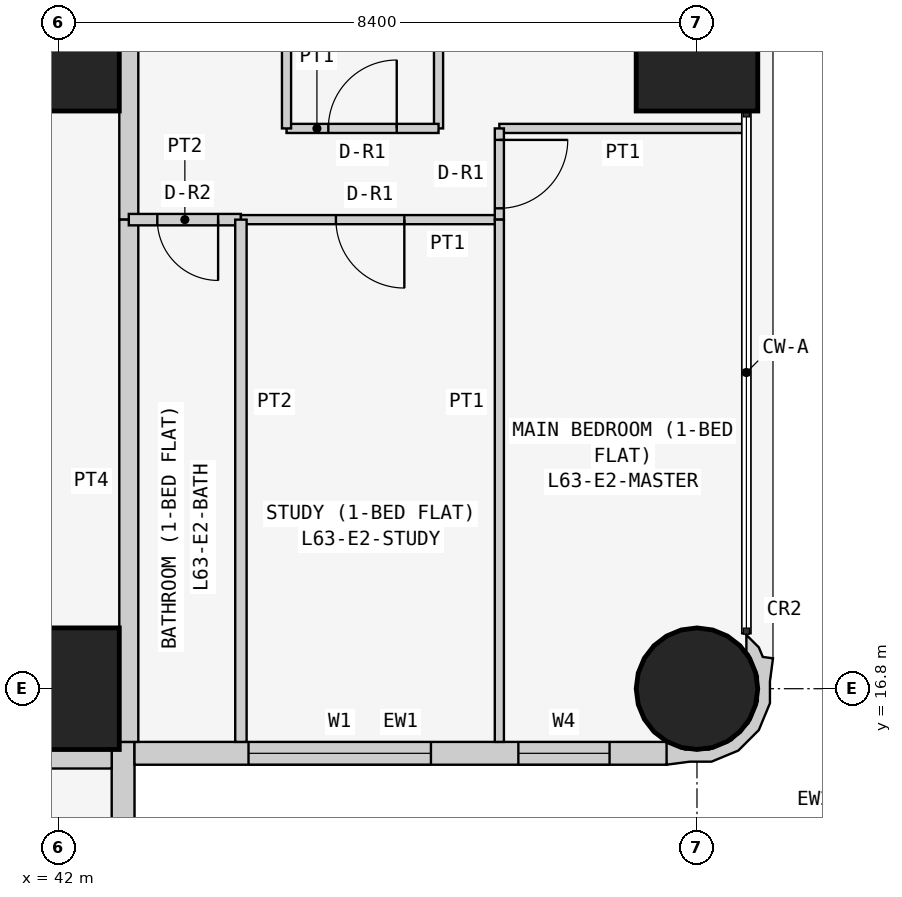
"""IFC4 building model, lengths in metres.
Left out: names, types, materials, properties, quantities, classifications, styles, units other than length and angle.
Written with IfcOpenShell. Run it as: python <this file> out.ifc"""

import sys

from ifc_helpers import new_model, si_unit, direction, frame, frame_2d, origin, origin_2d, place, context, subcontext, project, spatial, polyline, rectangle, circle, outline, extrude, element, fill, save


model = new_model("IFC4")
c1 = context("Model", 3, precision=1e-05, world=origin(), true_north=direction((0.0, 1.0)))
c2 = subcontext(c1, "Body", "Model", "MODEL_VIEW")
j1 = project(units=[si_unit("LENGTHUNIT", "METRE"), si_unit("PLANEANGLEUNIT", "RADIAN")], contexts=[c1])
p1 = place(None, origin())
s1 = spatial("IfcSite", under=j1, at=p1, CompositionType="ELEMENT")
p2 = place(p1, origin())
s2 = spatial("IfcBuilding", under=s1, at=p2, CompositionType="ELEMENT")
p3 = place(p2, frame((0.0, 0.0, 240.9)))
s3 = spatial("IfcBuildingStorey", under=s2, at=p3, CompositionType="ELEMENT", Elevation=240.9)
for number, where, z_axis, x_axis in (
    (1, (42.0, 16.8, 0.0), (0.0, 0.0, 1.0), (1.0, 0.0, 0.0)),
    (2, (42.0, 25.2, 0.0), (0.0, 0.0, 1.0), (1.0, 0.0, 0.0)),
):
    element("IfcColumn", number, at=place(p3, frame(where, z_axis=z_axis, x_axis=x_axis)), inside=s3, PredefinedType="COLUMN", context=c2, shape_type="SweptSolid", body=[
        extrude(rectangle(XDim=1.6, YDim=1.6, at=origin_2d()), origin(), (0.0, 0.0, 1.0), 3.6),
    ])
p4 = place(p3, frame((50.4, 16.8, 0.0), z_axis=(0.0, 0.0, 1.0), x_axis=(1.0, 0.0, 0.0)))
e3 = element("IfcColumn", 3, at=p4, inside=s3, PredefinedType="COLUMN", context=c2, shape_type="SweptSolid", body=[
    extrude(circle(Radius=0.8, at=origin_2d()), origin(), (0.0, 0.0, 1.0), 3.6),
])
p5 = place(p3, frame((50.4, 25.2, 0.0), z_axis=(0.0, 0.0, 1.0), x_axis=(1.0, 0.0, 0.0)))
e4 = element("IfcColumn", 4, at=p5, inside=s3, PredefinedType="COLUMN", context=c2, shape_type="SweptSolid", body=[
    extrude(rectangle(XDim=1.6, YDim=1.6, at=origin_2d()), origin(), (0.0, 0.0, 1.0), 3.6),
])
p6 = place(p3, frame((42.85, 8.8, 0.0), z_axis=(0.0, 0.0, 1.0), x_axis=(0.0, 1.0, 0.0)))
e5 = element("IfcWall", 5, at=p6, inside=s3, PredefinedType="SOLIDWALL", context=c2, shape_type="SweptSolid", body=[
    extrude(rectangle(XDim=7.3, YDim=0.3, at=frame_2d((3.65, 0.0))), origin(), (0.0, 0.0, 1.0), 3.45),
])
p7 = place(p6, frame((3.1, 0.0, 0.9)))
e6 = element("IfcOpeningElement", 6, at=p7, cuts=e5, PredefinedType="OPENING", context=c2, shape_type="SweptSolid", body=[
    extrude(rectangle(XDim=2.4, YDim=1.5, at=frame_2d((1.2, 0.75))), frame((0.0, 0.16, 0.0), z_axis=(0.0, -1.0, 0.0), x_axis=(1.0, 0.0, 0.0)), (0.0, 0.0, 1.0), 0.32),
])
p8 = place(p6, frame((0.75, 0.0, 0.9)))
e7 = element("IfcOpeningElement", 7, at=p8, cuts=e5, PredefinedType="OPENING", context=c2, shape_type="SweptSolid", body=[
    extrude(rectangle(XDim=1.2, YDim=1.5, at=frame_2d((0.6, 0.75))), frame((0.0, 0.16, 0.0), z_axis=(0.0, -1.0, 0.0), x_axis=(1.0, 0.0, 0.0)), (0.0, 0.0, 1.0), 0.32),
])
p9 = place(p3, frame((43.0, 15.95, 0.0), z_axis=(0.0, 0.0, 1.0), x_axis=(1.0, 0.0, 0.0)))
e8 = element("IfcWall", 8, at=p9, inside=s3, PredefinedType="SOLIDWALL", context=c2, shape_type="SweptSolid", body=[
    extrude(rectangle(XDim=7.0, YDim=0.3, at=frame_2d((3.5, 0.0))), origin(), (0.0, 0.0, 1.0), 3.45),
])
p10 = place(p9, frame((1.5, 0.0, 0.9)))
e9 = element("IfcOpeningElement", 9, at=p10, cuts=e8, PredefinedType="OPENING", context=c2, shape_type="SweptSolid", body=[
    extrude(rectangle(XDim=2.4, YDim=1.5, at=frame_2d((1.2, 0.75))), frame((0.0, 0.16, 0.0), z_axis=(0.0, -1.0, 0.0), x_axis=(1.0, 0.0, 0.0)), (0.0, 0.0, 1.0), 0.32),
])
p11 = place(p9, frame((5.05, 0.0, 0.9)))
e10 = element("IfcOpeningElement", 10, at=p11, cuts=e8, PredefinedType="OPENING", context=c2, shape_type="SweptSolid", body=[
    extrude(rectangle(XDim=1.2, YDim=1.5, at=frame_2d((0.6, 0.75))), frame((0.0, 0.16, 0.0), z_axis=(0.0, -1.0, 0.0), x_axis=(1.0, 0.0, 0.0)), (0.0, 0.0, 1.0), 0.32),
])
p12 = place(p3, frame((50.073, 15.983, 0.0), z_axis=(0.0, 0.0, 1.0), x_axis=(0.93923434088, -0.343276641956, 0.0)))
e11 = element("IfcWall", 11, at=p12, inside=s3, PredefinedType="SOLIDWALL", context=c2, shape_type="SweptSolid", body=[
    extrude(outline(polyline([(0.828, 1.598), (0.697, 1.569), (0.604, 1.67), (0.394, 1.767), (0.471, 1.556), (0.509, 1.539), (0.724, 1.304), (0.833, 1.005), (0.82, 0.686), (0.686, 0.397), (0.451, 0.182), (0.152, 0.073), (-0.116, 0.084), (-0.128, 0.078), (-0.146, 0.071), (-0.006, -0.197), (0.266, -0.055), (0.535, 0.044), (0.817, 0.302), (0.978, 0.648), (0.994, 1.03), (0.895, 1.3), (0.828, 1.598)])), origin(), (0.0, 0.0, 1.0), 3.45),
])
p13 = place(p3, frame((42.925, 29.4, 0.0), z_axis=(0.0, 0.0, 1.0), x_axis=(0.0, -1.0, 0.0)))
e12 = element("IfcWall", 12, at=p13, inside=s3, PredefinedType="PARTITIONING", context=c2, shape_type="SweptSolid", body=[
    extrude(rectangle(XDim=6.429, YDim=0.25, at=frame_2d((3.214, 0.0))), origin(), (0.0, 0.0, 1.0), 3.45),
])
p14 = place(p13, frame((0.5, 0.0, 0.0)))
e13 = element("IfcOpeningElement", 13, at=p14, cuts=e12, PredefinedType="OPENING", context=c2, shape_type="SweptSolid", body=[
    extrude(rectangle(XDim=1.0, YDim=2.1, at=frame_2d((0.5, 1.05))), frame((0.0, 0.135, 0.0), z_axis=(0.0, -1.0, 0.0), x_axis=(1.0, 0.0, 0.0)), (0.0, 0.0, 1.0), 0.27),
])
for number, where, z_axis, x_axis in (
    (14, (42.925, 22.971, 0.0), (0.0, 0.0, 1.0), (0.0, -1.0, 0.0)),
    (15, (42.7, 15.875, 0.0), (0.0, 0.0, 1.0), (-1.0, 0.0, 0.0)),
):
    element("IfcWall", number, at=place(p3, frame(where, z_axis=z_axis, x_axis=x_axis)), inside=s3, PredefinedType="PARTITIONING", context=c2, shape_type="SweptSolid", body=[
        extrude(rectangle(XDim=6.871, YDim=0.25, at=frame_2d((3.436, 0.0))), origin(), (0.0, 0.0, 1.0), 3.45),
    ])
p15 = place(p3, frame((47.0, 29.4, 0.0), z_axis=(0.0, 0.0, 1.0), x_axis=(0.0, -1.0, 0.0)))
e16 = element("IfcWall", 16, at=p15, inside=s3, PredefinedType="PARTITIONING", context=c2, shape_type="SweptSolid", body=[
    extrude(rectangle(XDim=5.229, YDim=0.12, at=frame_2d((2.615, 0.0))), origin(), (0.0, 0.0, 1.0), 3.45),
])
p16 = place(p3, frame((47.0, 24.171, 0.0), z_axis=(0.0, 0.0, 1.0), x_axis=(-1.0, 0.0, 0.0)))
e17 = element("IfcWall", 17, at=p16, inside=s3, PredefinedType="PARTITIONING", context=c2, shape_type="SweptSolid", body=[
    extrude(rectangle(XDim=2.0, YDim=0.12, at=frame_2d((1.0, 0.0))), origin(), (0.0, 0.0, 1.0), 3.45),
])
p17 = place(p16, frame((0.55, 0.0, 0.0)))
e18 = element("IfcOpeningElement", 18, at=p17, cuts=e17, PredefinedType="OPENING", context=c2, shape_type="SweptSolid", body=[
    extrude(rectangle(XDim=0.9, YDim=2.1, at=frame_2d((0.45, 1.05))), frame((0.0, 0.07, 0.0), z_axis=(0.0, -1.0, 0.0), x_axis=(1.0, 0.0, 0.0)), (0.0, 0.0, 1.0), 0.14),
])
p18 = place(p3, frame((45.0, 24.171, 0.0), z_axis=(0.0, 0.0, 1.0), x_axis=(0.0, 1.0, 0.0)))
e19 = element("IfcWall", 19, at=p18, inside=s3, PredefinedType="PARTITIONING", context=c2, shape_type="SweptSolid", body=[
    extrude(rectangle(XDim=5.229, YDim=0.12, at=frame_2d((2.615, 0.0))), origin(), (0.0, 0.0, 1.0), 3.45),
])
p19 = place(p3, frame((44.4, 22.971, 0.0), z_axis=(0.0, 0.0, 1.0), x_axis=(-1.0, 0.0, 0.0)))
e20 = element("IfcWall", 20, at=p19, inside=s3, PredefinedType="PARTITIONING", context=c2, shape_type="SweptSolid", body=[
    extrude(rectangle(XDim=1.475, YDim=0.15, at=frame_2d((0.737, 0.0))), origin(), (0.0, 0.0, 1.0), 3.45),
])
p20 = place(p19, frame((0.3, 0.0, 0.0)))
e21 = element("IfcOpeningElement", 21, at=p20, cuts=e20, PredefinedType="OPENING", context=c2, shape_type="SweptSolid", body=[
    extrude(rectangle(XDim=0.8, YDim=2.1, at=frame_2d((0.4, 1.05))), frame((0.0, 0.085, 0.0), z_axis=(0.0, -1.0, 0.0), x_axis=(1.0, 0.0, 0.0)), (0.0, 0.0, 1.0), 0.17),
])
p21 = place(p3, frame((47.8, 22.971, 0.0), z_axis=(0.0, 0.0, 1.0), x_axis=(-1.0, 0.0, 0.0)))
e22 = element("IfcWall", 22, at=p21, inside=s3, PredefinedType="PARTITIONING", context=c2, shape_type="SweptSolid", body=[
    extrude(rectangle(XDim=3.4, YDim=0.12, at=frame_2d((1.7, 0.0))), origin(), (0.0, 0.0, 1.0), 3.45),
])
p22 = place(p21, frame((1.25, 0.0, 0.0)))
e23 = element("IfcOpeningElement", 23, at=p22, cuts=e22, PredefinedType="OPENING", context=c2, shape_type="SweptSolid", body=[
    extrude(rectangle(XDim=0.9, YDim=2.1, at=frame_2d((0.45, 1.05))), frame((0.0, 0.07, 0.0), z_axis=(0.0, -1.0, 0.0), x_axis=(1.0, 0.0, 0.0)), (0.0, 0.0, 1.0), 0.14),
])
p23 = place(p3, frame((51.05, 24.171, 0.0), z_axis=(0.0, 0.0, 1.0), x_axis=(-1.0, 0.0, 0.0)))
e24 = element("IfcWall", 24, at=p23, inside=s3, PredefinedType="PARTITIONING", context=c2, shape_type="SweptSolid", body=[
    extrude(rectangle(XDim=3.25, YDim=0.12, at=frame_2d((1.625, 0.0))), origin(), (0.0, 0.0, 1.0), 3.45),
])
p24 = place(p3, frame((47.8, 24.171, 0.0), z_axis=(0.0, 0.0, 1.0), x_axis=(0.0, -1.0, 0.0)))
e25 = element("IfcWall", 25, at=p24, inside=s3, PredefinedType="PARTITIONING", context=c2, shape_type="SweptSolid", body=[
    extrude(rectangle(XDim=1.2, YDim=0.12, at=frame_2d((0.6, 0.0))), origin(), (0.0, 0.0, 1.0), 3.45),
])
p25 = place(p24, frame((0.151, 0.0, 0.0)))
e26 = element("IfcOpeningElement", 26, at=p25, cuts=e25, PredefinedType="OPENING", context=c2, shape_type="SweptSolid", body=[
    extrude(rectangle(XDim=0.9, YDim=2.1, at=frame_2d((0.45, 1.05))), frame((0.0, 0.07, 0.0), z_axis=(0.0, -1.0, 0.0), x_axis=(1.0, 0.0, 0.0)), (0.0, 0.0, 1.0), 0.14),
])
p26 = place(p3, frame((44.4, 22.971, 0.0), z_axis=(0.0, 0.0, 1.0), x_axis=(0.0, -1.0, 0.0)))
e27 = element("IfcWall", 27, at=p26, inside=s3, PredefinedType="PARTITIONING", context=c2, shape_type="SweptSolid", body=[
    extrude(rectangle(XDim=6.871, YDim=0.15, at=frame_2d((3.436, 0.0))), origin(), (0.0, 0.0, 1.0), 3.45),
])
p27 = place(p3, frame((47.8, 22.971, 0.0), z_axis=(0.0, 0.0, 1.0), x_axis=(0.0, -1.0, 0.0)))
e28 = element("IfcWall", 28, at=p27, inside=s3, PredefinedType="PARTITIONING", context=c2, shape_type="SweptSolid", body=[
    extrude(rectangle(XDim=6.871, YDim=0.12, at=frame_2d((3.436, 0.0))), origin(), (0.0, 0.0, 1.0), 3.45),
])
p28 = place(p10, origin())
e29 = element("IfcWindow", 29, at=p28, inside=s3, PartitioningType="SINGLE_PANEL", PredefinedType="WINDOW", context=c2, shape_type="SweptSolid", body=[
    extrude(rectangle(XDim=2.4, YDim=1.5, at=frame_2d((1.2, 0.75))), frame((0.0, 0.03, 0.0), z_axis=(0.0, -1.0, 0.0), x_axis=(1.0, 0.0, 0.0)), (0.0, 0.0, 1.0), 0.06),
])
fill(e9, e29)
p29 = place(p11, origin())
e30 = element("IfcWindow", 30, at=p29, inside=s3, PartitioningType="SINGLE_PANEL", PredefinedType="WINDOW", context=c2, shape_type="SweptSolid", body=[
    extrude(rectangle(XDim=1.2, YDim=1.5, at=frame_2d((0.6, 0.75))), frame((0.0, 0.03, 0.0), z_axis=(0.0, -1.0, 0.0), x_axis=(1.0, 0.0, 0.0)), (0.0, 0.0, 1.0), 0.06),
])
fill(e10, e30)
p30 = place(p17, frame((0.9, 0.0, 0.0), z_axis=(0.0, 0.0, 1.0), x_axis=(-1.0, 0.0, 0.0)))
e31 = element("IfcDoor", 31, at=p30, inside=s3, OperationType="SINGLE_SWING_RIGHT", PredefinedType="DOOR", context=c2, shape_type="SweptSolid", body=[
    extrude(rectangle(XDim=0.9, YDim=2.1, at=frame_2d((0.45, 1.05))), frame((0.0, 0.025, 0.0), z_axis=(0.0, -1.0, 0.0), x_axis=(1.0, 0.0, 0.0)), (0.0, 0.0, 1.0), 0.05),
])
fill(e18, e31)
p31 = place(p20, origin())
e32 = element("IfcDoor", 32, at=p31, inside=s3, OperationType="SINGLE_SWING_LEFT", PredefinedType="DOOR", context=c2, shape_type="SweptSolid", body=[
    extrude(rectangle(XDim=0.8, YDim=2.1, at=frame_2d((0.4, 1.05))), frame((0.0, 0.025, 0.0), z_axis=(0.0, -1.0, 0.0), x_axis=(1.0, 0.0, 0.0)), (0.0, 0.0, 1.0), 0.05),
])
fill(e21, e32)
p32 = place(p22, origin())
e33 = element("IfcDoor", 33, at=p32, inside=s3, OperationType="SINGLE_SWING_LEFT", PredefinedType="DOOR", context=c2, shape_type="SweptSolid", body=[
    extrude(rectangle(XDim=0.9, YDim=2.1, at=frame_2d((0.45, 1.05))), frame((0.0, 0.025, 0.0), z_axis=(0.0, -1.0, 0.0), x_axis=(1.0, 0.0, 0.0)), (0.0, 0.0, 1.0), 0.05),
])
fill(e23, e33)
p33 = place(p25, origin())
e34 = element("IfcDoor", 34, at=p33, inside=s3, OperationType="SINGLE_SWING_LEFT", PredefinedType="DOOR", context=c2, shape_type="SweptSolid", body=[
    extrude(rectangle(XDim=0.9, YDim=2.1, at=frame_2d((0.45, 1.05))), frame((0.0, 0.025, 0.0), z_axis=(0.0, -1.0, 0.0), x_axis=(1.0, 0.0, 0.0)), (0.0, 0.0, 1.0), 0.05),
])
fill(e26, e34)
save(model, sys.argv[1])
